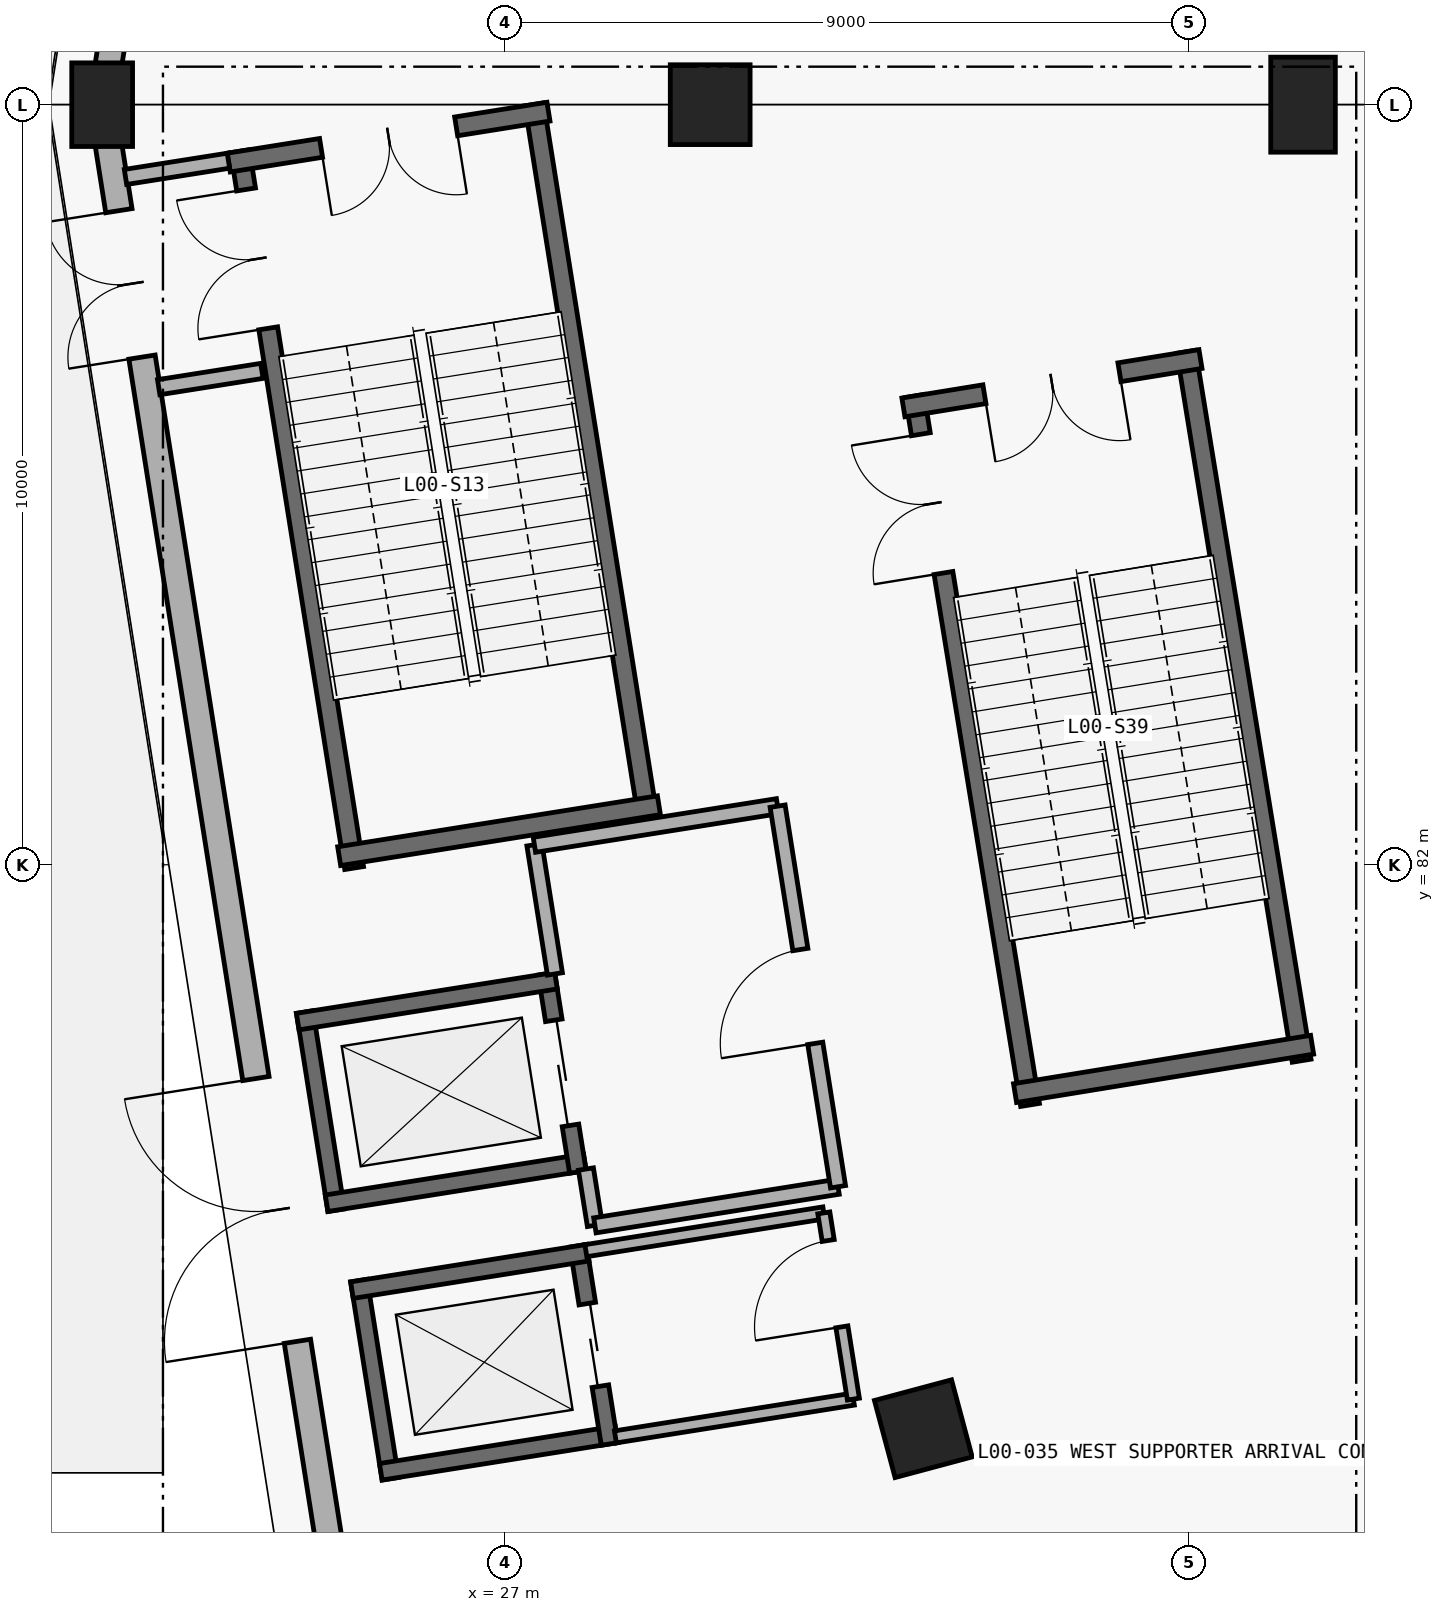
"""IFC4 building model, lengths in metres.
Left out: names, types, materials, properties, quantities, classifications, styles, units other than length and angle.
Written with IfcOpenShell. Run it as: python <this file> out.ifc"""

import sys

from ifc_helpers import new_model, si_unit, direction, frame, frame_2d, origin, origin_2d, place, context, subcontext, project, spatial, rectangle, extrude, element, fill, save


model = new_model("IFC4")
c1 = context("Model", 3, precision=1e-05, world=origin(), true_north=direction((0.0, 1.0)))
c2 = subcontext(c1, "Body", "Model", "MODEL_VIEW")
j1 = project(units=[si_unit("LENGTHUNIT", "METRE"), si_unit("PLANEANGLEUNIT", "RADIAN")], contexts=[c1])
p1 = place(None, origin())
s1 = spatial("IfcSite", under=j1, at=p1, CompositionType="ELEMENT")
p2 = place(p1, origin())
s2 = spatial("IfcBuilding", under=s1, at=p2, CompositionType="ELEMENT")
p3 = place(p2, origin())
s3 = spatial("IfcBuildingStorey", under=s2, at=p3, CompositionType="ELEMENT", Elevation=0.0)
p4 = place(p3, frame((37.5, 92.0, 0.0), z_axis=(0.0, 0.0, 1.0), x_axis=(1.0, 0.0, 0.0)))
e1 = element("IfcColumn", 1, at=p4, inside=s3, PredefinedType="COLUMN", context=c2, shape_type="SweptSolid", body=[
    extrude(rectangle(XDim=0.85, YDim=1.25, at=origin_2d()), origin(), (0.0, 0.0, 1.0), 5.4),
])
p5 = place(p3, frame((21.7, 92.0, 0.0), z_axis=(0.0, 0.0, 1.0), x_axis=(1.0, 0.0, 0.0)))
e2 = element("IfcColumn", 2, at=p5, inside=s3, PredefinedType="COLUMN", context=c2, shape_type="SweptSolid", body=[
    extrude(rectangle(XDim=0.8, YDim=1.1, at=origin_2d()), origin(), (0.0, 0.0, 1.0), 5.4),
])
for number, where, z_axis, x_axis in (
    (3, (29.7, 92.0, 0.0), (0.0, 0.0, 1.0), (1.0, 0.0, 0.0)),
    (4, (32.504, 74.581, 0.0), (0.0, 0.0, 1.0), (0.966, 0.259, 0.0)),
):
    element("IfcColumn", number, at=place(p3, frame(where, z_axis=z_axis, x_axis=x_axis)), inside=s3, PredefinedType="COLUMN", context=c2, shape_type="SweptSolid", body=[
        extrude(rectangle(XDim=1.05, YDim=1.05, at=origin_2d()), origin(), (0.0, 0.0, 1.0), 5.4),
    ])
p6 = place(p3, frame((21.783, 92.525, 0.0), z_axis=(0.0, 0.0, 1.0), x_axis=(0.155972645656, 0.987761374932, 0.0)))
e5 = element("IfcWall", 5, at=p6, inside=s3, PredefinedType="STANDARD", context=c2, shape_type="SweptSolid", body=[
    extrude(rectangle(XDim=18.671, YDim=0.35, at=frame_2d((9.335, 0.0))), origin(), (0.0, 0.0, 1.0), 4.165),
])
p7 = place(p6, frame((11.73, 0.0, 0.0)))
e6 = element("IfcOpeningElement", 6, at=p7, cuts=e5, PredefinedType="OPENING", context=c2, shape_type="SweptSolid", body=[
    extrude(rectangle(XDim=1.95, YDim=2.25, at=frame_2d((0.975, 1.125))), frame((0.0, 0.185, 0.0), z_axis=(0.0, -1.0, 0.0), x_axis=(1.0, 0.0, 0.0)), (0.0, 0.0, 1.0), 0.37),
])
p8 = place(p6, frame((1.114, 0.0, 0.0)))
e7 = element("IfcOpeningElement", 7, at=p8, cuts=e5, PredefinedType="OPENING", context=c2, shape_type="SweptSolid", body=[
    extrude(rectangle(XDim=3.0, YDim=2.55, at=frame_2d((1.5, 1.275))), frame((0.0, 0.185, 0.0), z_axis=(0.0, -1.0, 0.0), x_axis=(1.0, 0.0, 0.0)), (0.0, 0.0, 1.0), 0.37),
])
p9 = place(p3, frame((24.695, 73.033, 0.0), z_axis=(0.0, 0.0, 1.0), x_axis=(-0.155972645656, 0.987761374932, 0.0)))
e8 = element("IfcWall", 8, at=p9, inside=s3, PredefinedType="STANDARD", context=c2, shape_type="SweptSolid", body=[
    extrude(rectangle(XDim=18.671, YDim=0.35, at=frame_2d((9.335, 0.0))), origin(), (0.0, 0.0, 1.0), 4.165),
])
p10 = place(p9, frame((15.84, 0.0, 0.0)))
e9 = element("IfcOpeningElement", 9, at=p10, cuts=e8, PredefinedType="OPENING", context=c2, shape_type="SweptSolid", body=[
    extrude(rectangle(XDim=1.95, YDim=2.25, at=frame_2d((0.975, 1.125))), frame((0.0, 0.185, 0.0), z_axis=(0.0, -1.0, 0.0), x_axis=(1.0, 0.0, 0.0)), (0.0, 0.0, 1.0), 0.37),
])
p11 = place(p9, frame((2.731, 0.0, 0.0)))
e10 = element("IfcOpeningElement", 10, at=p11, cuts=e8, PredefinedType="OPENING", context=c2, shape_type="SweptSolid", body=[
    extrude(rectangle(XDim=3.5, YDim=2.68, at=frame_2d((1.75, 1.34))), frame((0.0, 0.185, 0.0), z_axis=(0.0, -1.0, 0.0), x_axis=(1.0, 0.0, 0.0)), (0.0, 0.0, 1.0), 0.37),
])
p12 = place(p3, frame((25.016, 81.957, 0.0), z_axis=(0.0, 0.0, 1.0), x_axis=(-0.157268610044, 0.987555863886, 0.0)))
e11 = element("IfcWall", 11, at=p12, inside=s3, PredefinedType="SHEAR", context=c2, shape_type="SweptSolid", body=[
    extrude(rectangle(XDim=9.55, YDim=0.25, at=frame_2d((4.775, 0.0))), origin(), (0.0, 0.0, 1.0), 5.1),
])
p13 = place(p12, frame((7.19, 0.0, 0.0)))
e12 = element("IfcOpeningElement", 12, at=p13, cuts=e11, PredefinedType="OPENING", context=c2, shape_type="SweptSolid", body=[
    extrude(rectangle(XDim=1.85, YDim=2.3, at=frame_2d((0.925, 1.15))), frame((0.0, 0.135, 0.0), z_axis=(0.0, -1.0, 0.0), x_axis=(1.0, 0.0, 0.0)), (0.0, 0.0, 1.0), 0.27),
])
p14 = place(p3, frame((28.887, 82.573, 0.0), z_axis=(0.0, 0.0, 1.0), x_axis=(-0.157243678356, 0.987559833943, 0.0)))
e13 = element("IfcWall", 13, at=p14, inside=s3, PredefinedType="SHEAR", context=c2, shape_type="SweptSolid", body=[
    extrude(rectangle(XDim=9.55, YDim=0.25, at=frame_2d((4.775, 0.0))), origin(), (0.0, 0.0, 1.0), 5.1),
])
p15 = place(p3, frame((27.573, 91.908, 0.0), z_axis=(0.0, 0.0, 1.0), x_axis=(-0.987557660991, -0.157257324847, 0.0)))
e14 = element("IfcWall", 14, at=p15, inside=s3, PredefinedType="SHEAR", context=c2, shape_type="SweptSolid", body=[
    extrude(rectangle(XDim=4.26, YDim=0.25, at=frame_2d((2.13, 0.0))), origin(), (0.0, 0.0, 1.0), 5.1),
])
p16 = place(p15, frame((1.23, 0.0, 0.0)))
e15 = element("IfcOpeningElement", 15, at=p16, cuts=e14, PredefinedType="OPENING", context=c2, shape_type="SweptSolid", body=[
    extrude(rectangle(XDim=1.8, YDim=2.25, at=frame_2d((0.9, 1.125))), frame((0.0, 0.135, 0.0), z_axis=(0.0, -1.0, 0.0), x_axis=(1.0, 0.0, 0.0)), (0.0, 0.0, 1.0), 0.27),
])
p17 = place(p3, frame((24.819, 82.113, 0.0), z_axis=(0.0, 0.0, 1.0), x_axis=(0.987557660991, 0.157257324847, 0.0)))
e16 = element("IfcWall", 16, at=p17, inside=s3, PredefinedType="SHEAR", context=c2, shape_type="SweptSolid", body=[
    extrude(rectangle(XDim=4.26, YDim=0.25, at=frame_2d((2.13, 0.0))), origin(), (0.0, 0.0, 1.0), 5.1),
])
p18 = place(p3, frame((33.908, 78.841, 0.0), z_axis=(0.0, 0.0, 1.0), x_axis=(-0.160694331821, 0.987004220721, 0.0)))
e17 = element("IfcWall", 17, at=p18, inside=s3, PredefinedType="SHEAR", context=c2, shape_type="SweptSolid", body=[
    extrude(rectangle(XDim=9.45, YDim=0.25, at=frame_2d((4.725, 0.0))), origin(), (0.0, 0.0, 1.0), 5.1),
])
p19 = place(p18, frame((7.09, 0.0, 0.0)))
e18 = element("IfcOpeningElement", 18, at=p19, cuts=e17, PredefinedType="OPENING", context=c2, shape_type="SweptSolid", body=[
    extrude(rectangle(XDim=1.85, YDim=2.3, at=frame_2d((0.925, 1.15))), frame((0.0, 0.135, 0.0), z_axis=(0.0, -1.0, 0.0), x_axis=(1.0, 0.0, 0.0)), (0.0, 0.0, 1.0), 0.27),
])
p20 = place(p3, frame((37.481, 79.422, 0.0), z_axis=(0.0, 0.0, 1.0), x_axis=(-0.160690234322, 0.987004887827, 0.0)))
e19 = element("IfcWall", 19, at=p20, inside=s3, PredefinedType="SHEAR", context=c2, shape_type="SweptSolid", body=[
    extrude(rectangle(XDim=9.45, YDim=0.25, at=frame_2d((4.725, 0.0))), origin(), (0.0, 0.0, 1.0), 5.1),
])
p21 = place(p3, frame((36.151, 88.654, 0.0), z_axis=(0.0, 0.0, 1.0), x_axis=(-0.986998628025, -0.160728679072, 0.0)))
e20 = element("IfcWall", 20, at=p21, inside=s3, PredefinedType="SHEAR", context=c2, shape_type="SweptSolid", body=[
    extrude(rectangle(XDim=3.96, YDim=0.25, at=frame_2d((1.98, 0.0))), origin(), (0.0, 0.0, 1.0), 5.1),
])
p22 = place(p21, frame((1.08, 0.0, 0.0)))
e21 = element("IfcOpeningElement", 21, at=p22, cuts=e20, PredefinedType="OPENING", context=c2, shape_type="SweptSolid", body=[
    extrude(rectangle(XDim=1.8, YDim=2.25, at=frame_2d((0.9, 1.125))), frame((0.0, 0.135, 0.0), z_axis=(0.0, -1.0, 0.0), x_axis=(1.0, 0.0, 0.0)), (0.0, 0.0, 1.0), 0.27),
])
p23 = place(p3, frame((33.711, 78.996, 0.0), z_axis=(0.0, 0.0, 1.0), x_axis=(0.987009998221, 0.160658841684, 0.0)))
e22 = element("IfcWall", 22, at=p23, inside=s3, PredefinedType="SHEAR", context=c2, shape_type="SweptSolid", body=[
    extrude(rectangle(XDim=3.96, YDim=0.25, at=frame_2d((1.98, 0.0))), origin(), (0.0, 0.0, 1.0), 5.1),
])
p24 = place(p3, frame((23.362, 91.263, 0.0), z_axis=(0.0, 0.0, 1.0), x_axis=(-0.987762965329, -0.155962573473, 0.0)))
e23 = element("IfcWall", 23, at=p24, inside=s3, PredefinedType="PARTITIONING", context=c2, shape_type="SweptSolid", body=[
    extrude(rectangle(XDim=1.371, YDim=0.2, at=frame_2d((0.686, 0.0))), origin(), (0.0, 0.0, 1.0), 4.165),
])
p25 = place(p3, frame((23.802, 88.498, 0.0), z_axis=(0.0, 0.0, 1.0), x_axis=(-0.987737028971, -0.15612674851, 0.0)))
e24 = element("IfcWall", 24, at=p25, inside=s3, PredefinedType="PARTITIONING", context=c2, shape_type="SweptSolid", body=[
    extrude(rectangle(XDim=1.375, YDim=0.2, at=frame_2d((0.687, 0.0))), origin(), (0.0, 0.0, 1.0), 4.165),
])
p26 = place(p3, frame((24.365, 80.063, 0.0), z_axis=(0.0, 0.0, 1.0), x_axis=(0.156807626334, -0.987629165387, 0.0)))
e25 = element("IfcWall", 25, at=p26, inside=s3, PredefinedType="SHEAR", context=c2, shape_type="SweptSolid", body=[
    extrude(rectangle(XDim=2.641, YDim=0.22, at=frame_2d((1.32, 0.0))), origin(), (0.0, 0.0, 1.0), 5.1),
])
p27 = place(p3, frame((24.653, 77.547, 0.0), z_axis=(0.0, 0.0, 1.0), x_axis=(0.987703627881, 0.156337914372, 0.0)))
e26 = element("IfcWall", 26, at=p27, inside=s3, PredefinedType="SHEAR", context=c2, shape_type="SweptSolid", body=[
    extrude(rectangle(XDim=3.44, YDim=0.22, at=frame_2d((1.72, 0.0))), origin(), (0.0, 0.0, 1.0), 5.1),
])
p28 = place(p3, frame((27.959, 77.959, 0.0), z_axis=(0.0, 0.0, 1.0), x_axis=(-0.156807626334, 0.987629165387, 0.0)))
e27 = element("IfcWall", 27, at=p28, inside=s3, PredefinedType="SHEAR", context=c2, shape_type="SweptSolid", body=[
    extrude(rectangle(XDim=2.641, YDim=0.22, at=frame_2d((1.32, 0.0))), origin(), (0.0, 0.0, 1.0), 5.1),
])
p29 = place(p28, frame((0.62, 0.0, 0.0)))
e28 = element("IfcOpeningElement", 28, at=p29, cuts=e27, PredefinedType="OPENING", context=c2, shape_type="SweptSolid", body=[
    extrude(rectangle(XDim=1.4, YDim=2.2, at=frame_2d((0.7, 1.1))), frame((0.0, 0.12, 0.0), z_axis=(0.0, -1.0, 0.0), x_axis=(1.0, 0.0, 0.0)), (0.0, 0.0, 1.0), 0.24),
])
p30 = place(p3, frame((27.671, 80.475, 0.0), z_axis=(0.0, 0.0, 1.0), x_axis=(-0.987692667337, -0.156407144619, 0.0)))
e29 = element("IfcWall", 29, at=p30, inside=s3, PredefinedType="SHEAR", context=c2, shape_type="SweptSolid", body=[
    extrude(rectangle(XDim=3.44, YDim=0.22, at=frame_2d((1.72, 0.0))), origin(), (0.0, 0.0, 1.0), 5.1),
])
p31 = place(p3, frame((28.183, 77.256, 0.0), z_axis=(0.0, 0.0, 1.0), x_axis=(-0.157482870509, 0.987521719, 0.0)))
e30 = element("IfcWall", 30, at=p31, inside=s3, PredefinedType="PARTITIONING", context=c2, shape_type="SweptSolid", body=[
    extrude(rectangle(XDim=0.75, YDim=0.2, at=frame_2d((0.375, 0.0))), origin(), (0.0, 0.0, 1.0), 5.08),
])
p32 = place(p3, frame((27.657, 80.564, 0.0), z_axis=(0.0, 0.0, 1.0), x_axis=(-0.156960903537, 0.987604817101, 0.0)))
e31 = element("IfcWall", 31, at=p32, inside=s3, PredefinedType="PARTITIONING", context=c2, shape_type="SweptSolid", body=[
    extrude(rectangle(XDim=1.72, YDim=0.2, at=frame_2d((0.86, 0.0))), origin(), (0.0, 0.0, 1.0), 5.08),
])
p33 = place(p3, frame((28.183, 77.256, 0.0), z_axis=(0.0, 0.0, 1.0), x_axis=(0.987633675984, 0.156779214382, 0.0)))
e32 = element("IfcWall", 32, at=p33, inside=s3, PredefinedType="PARTITIONING", context=c2, shape_type="SweptSolid", body=[
    extrude(rectangle(XDim=3.239, YDim=0.2, at=frame_2d((1.62, 0.0))), origin(), (0.0, 0.0, 1.0), 5.08),
])
p34 = place(p3, frame((27.387, 82.263, 0.0), z_axis=(0.0, 0.0, 1.0), x_axis=(0.987629416648, 0.156806043797, 0.0)))
e33 = element("IfcWall", 33, at=p34, inside=s3, PredefinedType="PARTITIONING", context=c2, shape_type="SweptSolid", body=[
    extrude(rectangle(XDim=3.24, YDim=0.2, at=frame_2d((1.62, 0.0))), origin(), (0.0, 0.0, 1.0), 5.08),
])
p35 = place(p3, frame((31.382, 77.764, 0.0), z_axis=(0.0, 0.0, 1.0), x_axis=(-0.156842848291, 0.987623572491, 0.0)))
e34 = element("IfcWall", 34, at=p35, inside=s3, PredefinedType="PARTITIONING", context=c2, shape_type="SweptSolid", body=[
    extrude(rectangle(XDim=5.07, YDim=0.2, at=frame_2d((2.535, 0.0))), origin(), (0.0, 0.0, 1.0), 5.08),
])
p36 = place(p35, frame((1.91, 0.0, 0.0)))
e35 = element("IfcOpeningElement", 35, at=p36, cuts=e34, PredefinedType="OPENING", context=c2, shape_type="SweptSolid", body=[
    extrude(rectangle(XDim=1.25, YDim=2.2, at=frame_2d((0.625, 1.1))), frame((0.0, 0.11, 0.0), z_axis=(0.0, -1.0, 0.0), x_axis=(1.0, 0.0, 0.0)), (0.0, 0.0, 1.0), 0.22),
])
p37 = place(p3, frame((25.078, 76.53, 0.0), z_axis=(0.0, 0.0, 1.0), x_axis=(0.156807626334, -0.987629165387, 0.0)))
e36 = element("IfcWall", 36, at=p37, inside=s3, PredefinedType="SHEAR", context=c2, shape_type="SweptSolid", body=[
    extrude(rectangle(XDim=2.641, YDim=0.22, at=frame_2d((1.32, 0.0))), origin(), (0.0, 0.0, 1.0), 5.1),
])
p38 = place(p3, frame((25.366, 74.014, 0.0), z_axis=(0.0, 0.0, 1.0), x_axis=(0.987645460109, 0.156704962032, 0.0)))
e37 = element("IfcWall", 37, at=p38, inside=s3, PredefinedType="SHEAR", context=c2, shape_type="SweptSolid", body=[
    extrude(rectangle(XDim=3.141, YDim=0.22, at=frame_2d((1.57, 0.0))), origin(), (0.0, 0.0, 1.0), 5.1),
])
p39 = place(p3, frame((28.376, 74.38, 0.0), z_axis=(0.0, 0.0, 1.0), x_axis=(-0.156793308963, 0.987631438475, 0.0)))
e38 = element("IfcWall", 38, at=p39, inside=s3, PredefinedType="SHEAR", context=c2, shape_type="SweptSolid", body=[
    extrude(rectangle(XDim=2.641, YDim=0.22, at=frame_2d((1.32, 0.0))), origin(), (0.0, 0.0, 1.0), 5.1),
])
p40 = place(p39, frame((0.77, 0.0, 0.0)))
e39 = element("IfcOpeningElement", 39, at=p40, cuts=e38, PredefinedType="OPENING", context=c2, shape_type="SweptSolid", body=[
    extrude(rectangle(XDim=1.1, YDim=2.15, at=frame_2d((0.55, 1.075))), frame((0.0, 0.12, 0.0), z_axis=(0.0, -1.0, 0.0), x_axis=(1.0, 0.0, 0.0)), (0.0, 0.0, 1.0), 0.24),
])
p41 = place(p3, frame((28.088, 76.896, 0.0), z_axis=(0.0, 0.0, 1.0), x_axis=(-0.98765558045, -0.156641164471, 0.0)))
e40 = element("IfcWall", 40, at=p41, inside=s3, PredefinedType="SHEAR", context=c2, shape_type="SweptSolid", body=[
    extrude(rectangle(XDim=3.141, YDim=0.22, at=frame_2d((1.57, 0.0))), origin(), (0.0, 0.0, 1.0), 5.1),
])
p42 = place(p3, frame((28.453, 74.473, 0.0), z_axis=(0.0, 0.0, 1.0), x_axis=(0.987632121619, 0.156789005818, 0.0)))
e41 = element("IfcWall", 41, at=p42, inside=s3, PredefinedType="PARTITIONING", context=c2, shape_type="SweptSolid", body=[
    extrude(rectangle(XDim=3.17, YDim=0.16, at=frame_2d((1.585, 0.0))), origin(), (0.0, 0.0, 1.0), 5.08),
])
p43 = place(p3, frame((28.064, 76.923, 0.0), z_axis=(0.0, 0.0, 1.0), x_axis=(0.987644043639, 0.156713889186, 0.0)))
e42 = element("IfcWall", 42, at=p43, inside=s3, PredefinedType="PARTITIONING", context=c2, shape_type="SweptSolid", body=[
    extrude(rectangle(XDim=3.17, YDim=0.16, at=frame_2d((1.585, 0.0))), origin(), (0.0, 0.0, 1.0), 5.08),
])
p44 = place(p3, frame((31.584, 74.97, 0.0), z_axis=(0.0, 0.0, 1.0), x_axis=(-0.156781258489, 0.987633351496, 0.0)))
e43 = element("IfcWall", 43, at=p44, inside=s3, PredefinedType="PARTITIONING", context=c2, shape_type="SweptSolid", body=[
    extrude(rectangle(XDim=2.481, YDim=0.16, at=frame_2d((1.24, 0.0))), origin(), (0.0, 0.0, 1.0), 5.08),
])
p45 = place(p44, frame((0.963, 0.0, 0.0)))
e44 = element("IfcOpeningElement", 44, at=p45, cuts=e43, PredefinedType="OPENING", context=c2, shape_type="SweptSolid", body=[
    extrude(rectangle(XDim=1.15, YDim=2.2, at=frame_2d((0.575, 1.1))), frame((0.0, 0.09, 0.0), z_axis=(0.0, -1.0, 0.0), x_axis=(1.0, 0.0, 0.0)), (0.0, 0.0, 1.0), 0.18),
])
p46 = place(p10, origin())
e45 = element("IfcDoor", 45, at=p46, inside=s3, OperationType="DOUBLE_DOOR_SINGLE_SWING", PredefinedType="DOOR", context=c2, shape_type="SweptSolid", body=[
    extrude(rectangle(XDim=1.95, YDim=2.25, at=frame_2d((0.975, 1.125))), frame((0.0, 0.025, 0.0), z_axis=(0.0, -1.0, 0.0), x_axis=(1.0, 0.0, 0.0)), (0.0, 0.0, 1.0), 0.05),
])
fill(e9, e45)
p47 = place(p11, origin())
e46 = element("IfcDoor", 46, at=p47, inside=s3, OperationType="DOUBLE_DOOR_SINGLE_SWING", PredefinedType="DOOR", context=c2, shape_type="SweptSolid", body=[
    extrude(rectangle(XDim=3.5, YDim=2.68, at=frame_2d((1.75, 1.34))), frame((0.0, 0.025, 0.0), z_axis=(0.0, -1.0, 0.0), x_axis=(1.0, 0.0, 0.0)), (0.0, 0.0, 1.0), 0.05),
])
fill(e10, e46)
p48 = place(p16, origin())
e47 = element("IfcDoor", 47, at=p48, inside=s3, OperationType="DOUBLE_DOOR_SINGLE_SWING", PredefinedType="DOOR", context=c2, shape_type="SweptSolid", body=[
    extrude(rectangle(XDim=1.8, YDim=2.25, at=frame_2d((0.9, 1.125))), frame((0.0, 0.025, 0.0), z_axis=(0.0, -1.0, 0.0), x_axis=(1.0, 0.0, 0.0)), (0.0, 0.0, 1.0), 0.05),
])
fill(e15, e47)
p49 = place(p13, origin())
e48 = element("IfcDoor", 48, at=p49, inside=s3, OperationType="DOUBLE_DOOR_SINGLE_SWING", PredefinedType="DOOR", context=c2, shape_type="SweptSolid", body=[
    extrude(rectangle(XDim=1.85, YDim=2.3, at=frame_2d((0.925, 1.15))), frame((0.0, 0.025, 0.0), z_axis=(0.0, -1.0, 0.0), x_axis=(1.0, 0.0, 0.0)), (0.0, 0.0, 1.0), 0.05),
])
fill(e12, e48)
p50 = place(p22, origin())
e49 = element("IfcDoor", 49, at=p50, inside=s3, OperationType="DOUBLE_DOOR_SINGLE_SWING", PredefinedType="DOOR", context=c2, shape_type="SweptSolid", body=[
    extrude(rectangle(XDim=1.8, YDim=2.25, at=frame_2d((0.9, 1.125))), frame((0.0, 0.025, 0.0), z_axis=(0.0, -1.0, 0.0), x_axis=(1.0, 0.0, 0.0)), (0.0, 0.0, 1.0), 0.05),
])
fill(e21, e49)
p51 = place(p19, origin())
e50 = element("IfcDoor", 50, at=p51, inside=s3, OperationType="DOUBLE_DOOR_SINGLE_SWING", PredefinedType="DOOR", context=c2, shape_type="SweptSolid", body=[
    extrude(rectangle(XDim=1.85, YDim=2.3, at=frame_2d((0.925, 1.15))), frame((0.0, 0.025, 0.0), z_axis=(0.0, -1.0, 0.0), x_axis=(1.0, 0.0, 0.0)), (0.0, 0.0, 1.0), 0.05),
])
fill(e18, e50)
p52 = place(p29, origin())
e51 = element("IfcDoor", 51, at=p52, inside=s3, OperationType="SLIDING_TO_LEFT", PredefinedType="DOOR", context=c2, shape_type="SweptSolid", body=[
    extrude(rectangle(XDim=1.4, YDim=2.2, at=frame_2d((0.7, 1.1))), frame((0.0, 0.025, 0.0), z_axis=(0.0, -1.0, 0.0), x_axis=(1.0, 0.0, 0.0)), (0.0, 0.0, 1.0), 0.05),
])
fill(e28, e51)
p53 = place(p36, origin())
e52 = element("IfcDoor", 52, at=p53, inside=s3, OperationType="SINGLE_SWING_LEFT", PredefinedType="DOOR", context=c2, shape_type="SweptSolid", body=[
    extrude(rectangle(XDim=1.25, YDim=2.2, at=frame_2d((0.625, 1.1))), frame((0.0, 0.025, 0.0), z_axis=(0.0, -1.0, 0.0), x_axis=(1.0, 0.0, 0.0)), (0.0, 0.0, 1.0), 0.05),
])
fill(e35, e52)
p54 = place(p40, origin())
e53 = element("IfcDoor", 53, at=p54, inside=s3, OperationType="SLIDING_TO_LEFT", PredefinedType="DOOR", context=c2, shape_type="SweptSolid", body=[
    extrude(rectangle(XDim=1.1, YDim=2.15, at=frame_2d((0.55, 1.075))), frame((0.0, 0.025, 0.0), z_axis=(0.0, -1.0, 0.0), x_axis=(1.0, 0.0, 0.0)), (0.0, 0.0, 1.0), 0.05),
])
fill(e39, e53)
p55 = place(p45, origin())
e54 = element("IfcDoor", 54, at=p55, inside=s3, OperationType="SINGLE_SWING_LEFT", PredefinedType="DOOR", context=c2, shape_type="SweptSolid", body=[
    extrude(rectangle(XDim=1.15, YDim=2.2, at=frame_2d((0.575, 1.1))), frame((0.0, 0.025, 0.0), z_axis=(0.0, -1.0, 0.0), x_axis=(1.0, 0.0, 0.0)), (0.0, 0.0, 1.0), 0.05),
])
fill(e44, e54)
save(model, sys.argv[1])
